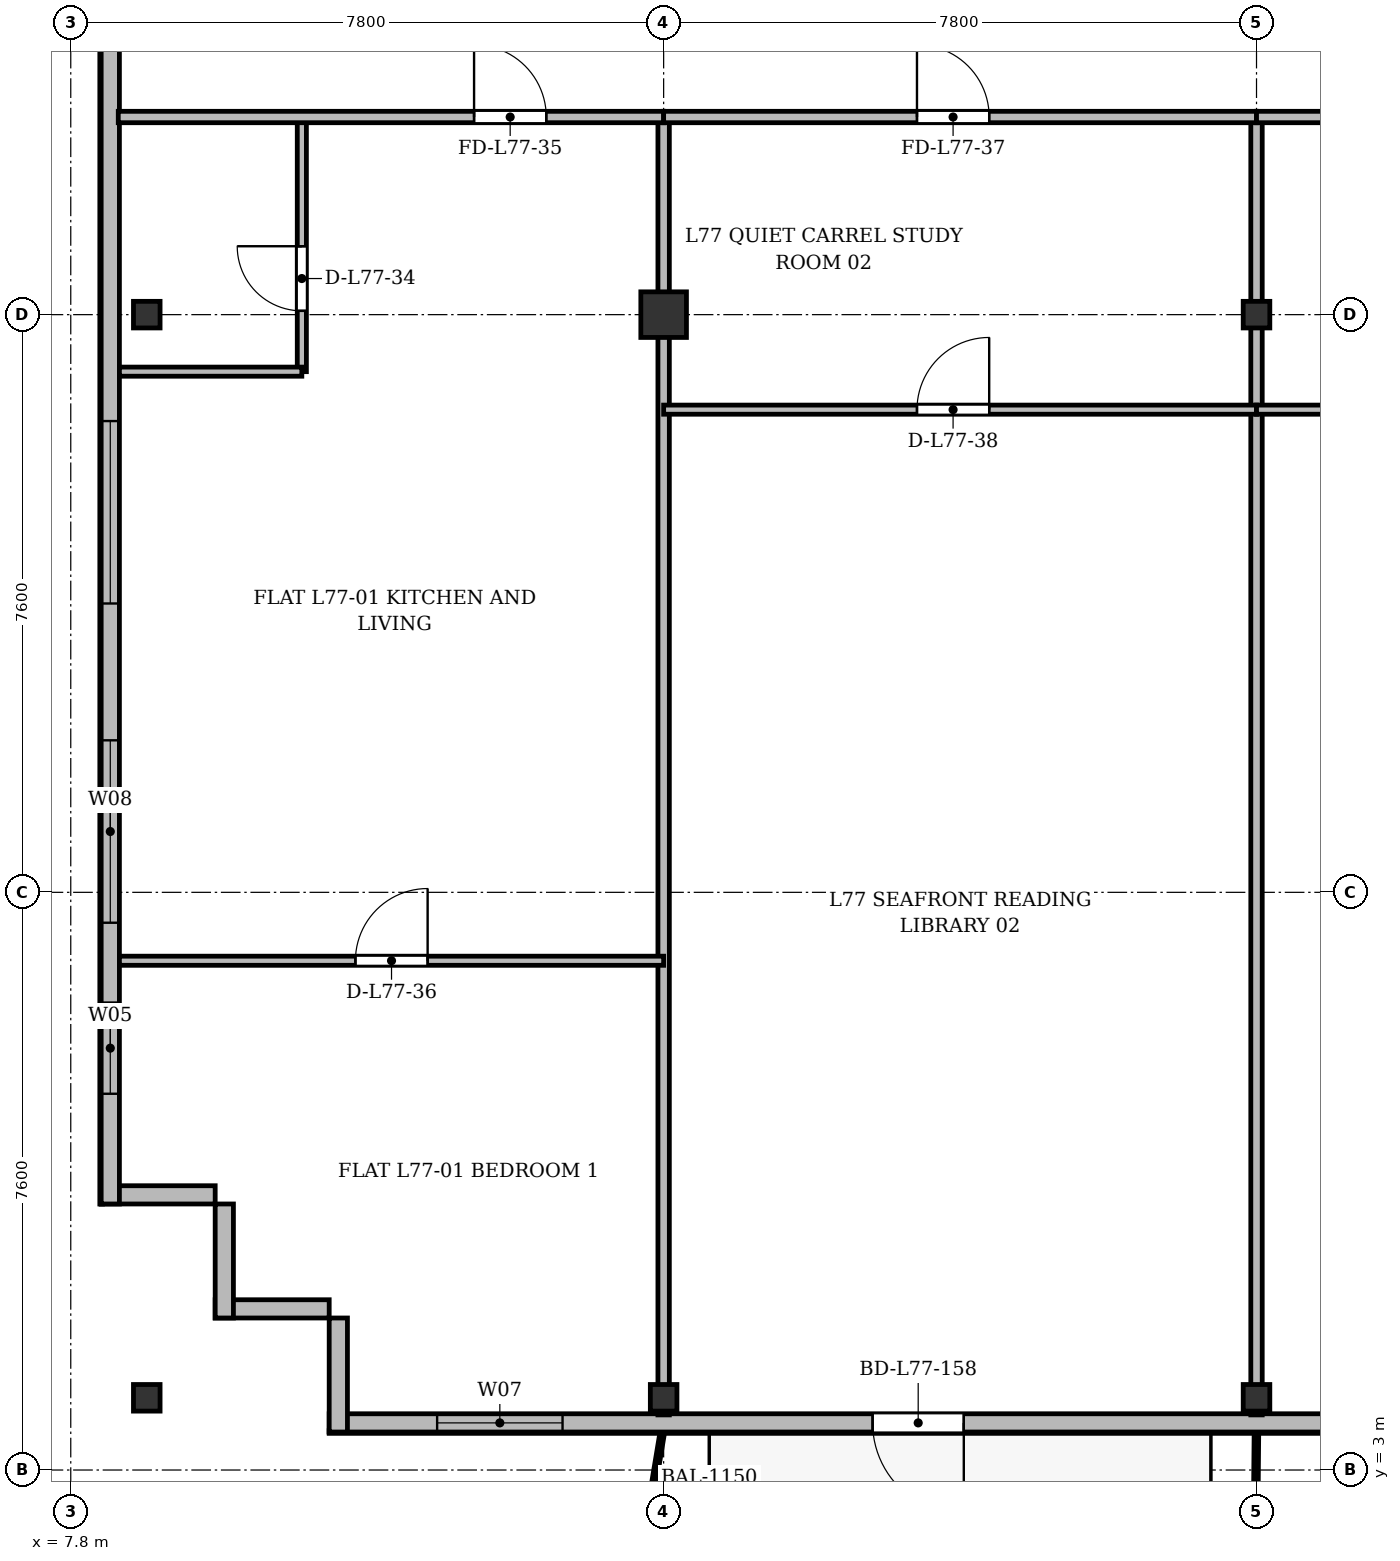
"""IFC4 building model, lengths in metres.
Left out: names, types, materials, properties, quantities, classifications, styles, units other than length and angle.
Written with IfcOpenShell. Run it as: python <this file> out.ifc"""

import sys

from ifc_helpers import new_model, si_unit, direction, frame, frame_2d, origin, origin_2d, place, context, subcontext, project, spatial, rectangle, i_section, extrude, source, transform, mapped, element, fill, save


model = new_model("IFC4")
c1 = context("Model", 3, precision=1e-05, world=origin(), true_north=direction((0.0, 1.0)))
c2 = subcontext(c1, "Body", "Model", "MODEL_VIEW")
j1 = project(units=[si_unit("LENGTHUNIT", "METRE"), si_unit("PLANEANGLEUNIT", "RADIAN")], contexts=[c1])
p1 = place(None, origin())
s1 = spatial("IfcSite", under=j1, at=p1, CompositionType="ELEMENT")
p2 = place(p1, origin())
s2 = spatial("IfcBuilding", under=s1, at=p2, CompositionType="ELEMENT")
p3 = place(p2, frame((0.0, 0.0, 295.5)))
s3 = spatial("IfcBuildingStorey", under=s2, at=p3, CompositionType="ELEMENT", Elevation=295.5)
m1 = source(origin(), c2, "Body", "SweptSolid", [
    extrude(i_section(OverallWidth=0.35, OverallDepth=0.35, WebThickness=0.018, FlangeThickness=0.028, at=origin_2d()), origin(), (0.0, 0.0, 1.0), 3.6),
])
for number, where, z_axis, x_axis in (
    (1, (8.8, 3.95, 0.0), (0.0, 0.0, 1.0), (1.0, 0.0, 0.0)),
    (2, (8.8, 18.2, 0.0), (0.0, 0.0, 1.0), (1.0, 0.0, 0.0)),
    (3, (15.6, 3.95, 0.0), (0.0, 0.0, 1.0), (1.0, 0.0, 0.0)),
):
    element("IfcColumn", number, at=place(p3, frame(where, z_axis=z_axis, x_axis=x_axis)), inside=s3, PredefinedType="COLUMN", context=c2, shape_type="MappedRepresentation", body=[
        mapped(m1, transform((0.0, 0.0, 0.0), x_axis=(1.0, 0.0, 0.0), y_axis=(0.0, 1.0, 0.0), z_axis=(0.0, 0.0, 1.0), scale=1.0)),
    ])
m2 = source(origin(), c2, "Body", "SweptSolid", [
    extrude(rectangle(XDim=0.6, YDim=0.6, at=origin_2d()), origin(), (0.0, 0.0, 1.0), 3.6),
])
p4 = place(p3, frame((15.6, 18.2, 0.0), z_axis=(0.0, 0.0, 1.0), x_axis=(1.0, 0.0, 0.0)))
e4 = element("IfcColumn", 4, at=p4, inside=s3, PredefinedType="COLUMN", context=c2, shape_type="MappedRepresentation", body=[
    mapped(m2, transform((0.0, 0.0, 0.0), x_axis=(1.0, 0.0, 0.0), y_axis=(0.0, 1.0, 0.0), z_axis=(0.0, 0.0, 1.0), scale=1.0)),
])
for number, where, z_axis, x_axis in (
    (5, (23.4, 3.95, 0.0), (0.0, 0.0, 1.0), (1.0, 0.0, 0.0)),
    (6, (23.4, 18.2, 0.0), (0.0, 0.0, 1.0), (1.0, 0.0, 0.0)),
):
    element("IfcColumn", number, at=place(p3, frame(where, z_axis=z_axis, x_axis=x_axis)), inside=s3, PredefinedType="COLUMN", context=c2, shape_type="MappedRepresentation", body=[
        mapped(m1, transform((0.0, 0.0, 0.0), x_axis=(1.0, 0.0, 0.0), y_axis=(0.0, 1.0, 0.0), z_axis=(0.0, 0.0, 1.0), scale=1.0)),
    ])
for number, where, z_axis, x_axis in (
    (7, (11.2, 5.12, 0.0), (0.0, 0.0, 1.0), (-1.0, 0.0, 0.0)),
    (8, (9.82, 5.0, 0.0), (0.0, 0.0, 1.0), (0.0, 1.0, 0.0)),
):
    element("IfcWall", number, at=place(p3, frame(where, z_axis=z_axis, x_axis=x_axis)), inside=s3, PredefinedType="SOLIDWALL", context=c2, shape_type="SweptSolid", body=[
        extrude(rectangle(XDim=1.5, YDim=0.24, at=frame_2d((0.75, 0.0))), origin(), (0.0, 0.0, 1.0), 3.26),
    ])
p5 = place(p3, frame((9.7, 6.62, 0.0), z_axis=(0.0, 0.0, 1.0), x_axis=(-1.0, 0.0, 0.0)))
e9 = element("IfcWall", 9, at=p5, inside=s3, PredefinedType="SOLIDWALL", context=c2, shape_type="SweptSolid", body=[
    extrude(rectangle(XDim=1.5, YDim=0.24, at=frame_2d((0.75, 0.0))), origin(), (0.0, 0.0, 1.0), 2.76),
])
p6 = place(p3, frame((8.32, 6.5, 0.0), z_axis=(0.0, 0.0, 1.0), x_axis=(0.0, 1.0, 0.0)))
e10 = element("IfcWall", 10, at=p6, inside=s3, PredefinedType="SOLIDWALL", context=c2, shape_type="SweptSolid", body=[
    extrude(rectangle(XDim=39.0, YDim=0.24, at=frame_2d((19.5, 0.0))), origin(), (0.0, 0.0, 1.0), 3.26),
])
p7 = place(p6, frame((1.45, 0.0, 0.92)))
e11 = element("IfcOpeningElement", 11, at=p7, cuts=e10, PredefinedType="OPENING", context=c2, shape_type="SweptSolid", body=[
    extrude(rectangle(XDim=1.2, YDim=1.65, at=frame_2d((0.6, 0.825))), frame((0.0, 0.13, 0.0), z_axis=(0.0, -1.0, 0.0), x_axis=(1.0, 0.0, 0.0)), (0.0, 0.0, 1.0), 0.26),
])
p8 = place(p6, frame((3.7, 0.0, 0.92)))
e12 = element("IfcOpeningElement", 12, at=p8, cuts=e10, PredefinedType="OPENING", context=c2, shape_type="SweptSolid", body=[
    extrude(rectangle(XDim=2.4, YDim=2.1, at=frame_2d((1.2, 1.05))), frame((0.0, 0.13, 0.0), z_axis=(0.0, -1.0, 0.0), x_axis=(1.0, 0.0, 0.0)), (0.0, 0.0, 1.0), 0.26),
])
p9 = place(p6, frame((7.9, 0.0, 0.92)))
e13 = element("IfcOpeningElement", 13, at=p9, cuts=e10, PredefinedType="OPENING", context=c2, shape_type="SweptSolid", body=[
    extrude(rectangle(XDim=2.4, YDim=2.1, at=frame_2d((1.2, 1.05))), frame((0.0, 0.13, 0.0), z_axis=(0.0, -1.0, 0.0), x_axis=(1.0, 0.0, 0.0)), (0.0, 0.0, 1.0), 0.26),
])
p10 = place(p6, frame((29.1, 0.0, 0.92)))
e14 = element("IfcOpeningElement", 14, at=p10, cuts=e10, PredefinedType="OPENING", context=c2, shape_type="SweptSolid", body=[
    extrude(rectangle(XDim=2.4, YDim=2.1, at=frame_2d((1.2, 1.05))), frame((0.0, 0.13, 0.0), z_axis=(0.0, -1.0, 0.0), x_axis=(1.0, 0.0, 0.0)), (0.0, 0.0, 1.0), 0.26),
])
p11 = place(p6, frame((33.3, 0.0, 0.92)))
e15 = element("IfcOpeningElement", 15, at=p11, cuts=e10, PredefinedType="OPENING", context=c2, shape_type="SweptSolid", body=[
    extrude(rectangle(XDim=1.2, YDim=1.65, at=frame_2d((0.6, 0.825))), frame((0.0, 0.13, 0.0), z_axis=(0.0, -1.0, 0.0), x_axis=(1.0, 0.0, 0.0)), (0.0, 0.0, 1.0), 0.26),
])
p12 = place(p6, frame((36.65, 0.0, 0.92)))
e16 = element("IfcOpeningElement", 16, at=p12, cuts=e10, PredefinedType="OPENING", context=c2, shape_type="SweptSolid", body=[
    extrude(rectangle(XDim=1.2, YDim=1.65, at=frame_2d((0.6, 0.825))), frame((0.0, 0.13, 0.0), z_axis=(0.0, -1.0, 0.0), x_axis=(1.0, 0.0, 0.0)), (0.0, 0.0, 1.0), 0.26),
])
p13 = place(p3, frame((31.4, 3.62, 0.0), z_axis=(0.0, 0.0, 1.0), x_axis=(-1.0, 0.0, 0.0)))
e17 = element("IfcWall", 17, at=p13, inside=s3, PredefinedType="SOLIDWALL", context=c2, shape_type="SweptSolid", body=[
    extrude(rectangle(XDim=20.2, YDim=0.24, at=frame_2d((10.1, 0.0))), origin(), (0.0, 0.0, 1.0), 3.26),
])
p14 = place(p13, frame((3.295, 0.0, 0.9)))
e18 = element("IfcOpeningElement", 18, at=p14, cuts=e17, PredefinedType="OPENING", context=c2, shape_type="SweptSolid", body=[
    extrude(rectangle(XDim=1.5, YDim=1.75, at=frame_2d((0.75, 0.875))), frame((0.0, 0.13, 0.0), z_axis=(0.0, -1.0, 0.0), x_axis=(1.0, 0.0, 0.0)), (0.0, 0.0, 1.0), 0.26),
])
p15 = place(p13, frame((11.851, 0.0, 0.0)))
e19 = element("IfcOpeningElement", 19, at=p15, cuts=e17, PredefinedType="OPENING", context=c2, shape_type="SweptSolid", body=[
    extrude(rectangle(XDim=1.2, YDim=2.2, at=frame_2d((0.6, 1.1))), frame((0.0, 0.13, 0.0), z_axis=(0.0, -1.0, 0.0), x_axis=(1.0, 0.0, 0.0)), (0.0, 0.0, 1.0), 0.26),
])
p16 = place(p13, frame((17.13, 0.0, 0.9)))
e20 = element("IfcOpeningElement", 20, at=p16, cuts=e17, PredefinedType="OPENING", context=c2, shape_type="SweptSolid", body=[
    extrude(rectangle(XDim=1.65, YDim=1.85, at=frame_2d((0.825, 0.925))), frame((0.0, 0.13, 0.0), z_axis=(0.0, -1.0, 0.0), x_axis=(1.0, 0.0, 0.0)), (0.0, 0.0, 1.0), 0.26),
])
p17 = place(p3, frame((11.32, 3.5, 0.0), z_axis=(0.0, 0.0, 1.0), x_axis=(0.0, 1.0, 0.0)))
e21 = element("IfcWall", 21, at=p17, inside=s3, PredefinedType="SOLIDWALL", context=c2, shape_type="SweptSolid", body=[
    extrude(rectangle(XDim=1.5, YDim=0.24, at=frame_2d((0.75, 0.0))), origin(), (0.0, 0.0, 1.0), 2.81),
])
for number, where, z_axis, x_axis in (
    (22, (15.6, 3.725, 0.0), (0.0, 0.0, 1.0), (0.0, 1.0, 0.0)),
    (23, (23.4, 3.725, 0.0), (0.0, 0.0, 1.0), (0.0, 1.0, 0.0)),
):
    element("IfcWall", number, at=place(p3, frame(where, z_axis=z_axis, x_axis=x_axis)), inside=s3, PredefinedType="PARTITIONING", context=c2, shape_type="SweptSolid", body=[
        extrude(rectangle(XDim=17.075, YDim=0.15, at=frame_2d((8.538, 0.0))), origin(), (0.0, 0.0, 1.0), 2.76),
    ])
p18 = place(p3, frame((10.84, 17.45, 0.0), z_axis=(0.0, 0.0, 1.0), x_axis=(0.0, 1.0, 0.0)))
e24 = element("IfcWall", 24, at=p18, inside=s3, PredefinedType="PARTITIONING", context=c2, shape_type="SweptSolid", body=[
    extrude(rectangle(XDim=3.35, YDim=0.12, at=frame_2d((1.675, 0.0))), origin(), (0.0, 0.0, 1.0), 2.81),
])
p19 = place(p18, frame((0.8, 0.0, 0.0)))
e25 = element("IfcOpeningElement", 25, at=p19, cuts=e24, PredefinedType="OPENING", context=c2, shape_type="SweptSolid", body=[
    extrude(rectangle(XDim=0.85, YDim=2.1, at=frame_2d((0.425, 1.05))), frame((0.0, 0.07, 0.0), z_axis=(0.0, -1.0, 0.0), x_axis=(1.0, 0.0, 0.0)), (0.0, 0.0, 1.0), 0.14),
])
p20 = place(p3, frame((8.44, 17.45, 0.0), z_axis=(0.0, 0.0, 1.0), x_axis=(1.0, 0.0, 0.0)))
e26 = element("IfcWall", 26, at=p20, inside=s3, PredefinedType="PARTITIONING", context=c2, shape_type="SweptSolid", body=[
    extrude(rectangle(XDim=2.4, YDim=0.12, at=frame_2d((1.2, 0.0))), origin(), (0.0, 0.0, 1.0), 2.76),
])
p21 = place(p3, frame((8.425, 20.8, 0.0), z_axis=(0.0, 0.0, 1.0), x_axis=(1.0, 0.0, 0.0)))
e27 = element("IfcWall", 27, at=p21, inside=s3, PredefinedType="PARTITIONING", context=c2, shape_type="SweptSolid", body=[
    extrude(rectangle(XDim=7.175, YDim=0.15, at=frame_2d((3.587, 0.0))), origin(), (0.0, 0.0, 1.0), 2.76),
])
p22 = place(p21, frame((4.681, 0.0, 0.0)))
e28 = element("IfcOpeningElement", 28, at=p22, cuts=e27, PredefinedType="OPENING", context=c2, shape_type="SweptSolid", body=[
    extrude(rectangle(XDim=0.95, YDim=2.15, at=frame_2d((0.475, 1.075))), frame((0.0, 0.085, 0.0), z_axis=(0.0, -1.0, 0.0), x_axis=(1.0, 0.0, 0.0)), (0.0, 0.0, 1.0), 0.17),
])
p23 = place(p3, frame((8.44, 9.7, 0.0), z_axis=(0.0, 0.0, 1.0), x_axis=(1.0, 0.0, 0.0)))
e29 = element("IfcWall", 29, at=p23, inside=s3, PredefinedType="PARTITIONING", context=c2, shape_type="SweptSolid", body=[
    extrude(rectangle(XDim=7.16, YDim=0.12, at=frame_2d((3.58, 0.0))), origin(), (0.0, 0.0, 1.0), 2.76),
])
p24 = place(p23, frame((3.105, 0.0, 0.0)))
e30 = element("IfcOpeningElement", 30, at=p24, cuts=e29, PredefinedType="OPENING", context=c2, shape_type="SweptSolid", body=[
    extrude(rectangle(XDim=0.95, YDim=2.15, at=frame_2d((0.475, 1.075))), frame((0.0, 0.07, 0.0), z_axis=(0.0, -1.0, 0.0), x_axis=(1.0, 0.0, 0.0)), (0.0, 0.0, 1.0), 0.14),
])
p25 = place(p3, frame((15.6, 20.8, 0.0), z_axis=(0.0, 0.0, 1.0), x_axis=(1.0, 0.0, 0.0)))
e31 = element("IfcWall", 31, at=p25, inside=s3, PredefinedType="PARTITIONING", context=c2, shape_type="SweptSolid", body=[
    extrude(rectangle(XDim=7.8, YDim=0.15, at=frame_2d((3.9, 0.0))), origin(), (0.0, 0.0, 1.0), 2.76),
])
p26 = place(p25, frame((3.333, 0.0, 0.0)))
e32 = element("IfcOpeningElement", 32, at=p26, cuts=e31, PredefinedType="OPENING", context=c2, shape_type="SweptSolid", body=[
    extrude(rectangle(XDim=0.95, YDim=2.15, at=frame_2d((0.475, 1.075))), frame((0.0, 0.085, 0.0), z_axis=(0.0, -1.0, 0.0), x_axis=(1.0, 0.0, 0.0)), (0.0, 0.0, 1.0), 0.17),
])
p27 = place(p3, frame((15.6, 16.95, 0.0), z_axis=(0.0, 0.0, 1.0), x_axis=(1.0, 0.0, 0.0)))
e33 = element("IfcWall", 33, at=p27, inside=s3, PredefinedType="PARTITIONING", context=c2, shape_type="SweptSolid", body=[
    extrude(rectangle(XDim=7.8, YDim=0.12, at=frame_2d((3.9, 0.0))), origin(), (0.0, 0.0, 1.0), 2.76),
])
p28 = place(p27, frame((3.333, 0.0, 0.0)))
e34 = element("IfcOpeningElement", 34, at=p28, cuts=e33, PredefinedType="OPENING", context=c2, shape_type="SweptSolid", body=[
    extrude(rectangle(XDim=0.95, YDim=2.15, at=frame_2d((0.475, 1.075))), frame((0.0, 0.07, 0.0), z_axis=(0.0, -1.0, 0.0), x_axis=(1.0, 0.0, 0.0)), (0.0, 0.0, 1.0), 0.14),
])
p29 = place(p3, frame((23.4, 20.8, 0.0), z_axis=(0.0, 0.0, 1.0), x_axis=(1.0, 0.0, 0.0)))
e35 = element("IfcWall", 35, at=p29, inside=s3, PredefinedType="PARTITIONING", context=c2, shape_type="SweptSolid", body=[
    extrude(rectangle(XDim=9.8, YDim=0.15, at=frame_2d((4.9, 0.0))), origin(), (0.0, 0.0, 1.0), 2.76),
])
p30 = place(p29, frame((4.425, 0.0, 0.0)))
e36 = element("IfcOpeningElement", 36, at=p30, cuts=e35, PredefinedType="OPENING", context=c2, shape_type="SweptSolid", body=[
    extrude(rectangle(XDim=0.95, YDim=2.15, at=frame_2d((0.475, 1.075))), frame((0.0, 0.085, 0.0), z_axis=(0.0, -1.0, 0.0), x_axis=(1.0, 0.0, 0.0)), (0.0, 0.0, 1.0), 0.17),
])
p31 = place(p3, frame((23.4, 16.95, 0.0), z_axis=(0.0, 0.0, 1.0), x_axis=(1.0, 0.0, 0.0)))
e37 = element("IfcWall", 37, at=p31, inside=s3, PredefinedType="PARTITIONING", context=c2, shape_type="SweptSolid", body=[
    extrude(rectangle(XDim=9.8, YDim=0.12, at=frame_2d((4.9, 0.0))), origin(), (0.0, 0.0, 1.0), 2.76),
])
p32 = place(p31, frame((4.425, 0.0, 0.0)))
e38 = element("IfcOpeningElement", 38, at=p32, cuts=e37, PredefinedType="OPENING", context=c2, shape_type="SweptSolid", body=[
    extrude(rectangle(XDim=0.95, YDim=2.15, at=frame_2d((0.475, 1.075))), frame((0.0, 0.07, 0.0), z_axis=(0.0, -1.0, 0.0), x_axis=(1.0, 0.0, 0.0)), (0.0, 0.0, 1.0), 0.14),
])
m3 = source(origin(), c2, "Body", "SweptSolid", [
    extrude(rectangle(XDim=1.2, YDim=1.65, at=frame_2d((0.6, 0.825))), frame((0.0, 0.03, 0.0), z_axis=(0.0, -1.0, 0.0), x_axis=(1.0, 0.0, 0.0)), (0.0, 0.0, 1.0), 0.06),
])
p33 = place(p7, origin())
e39 = element("IfcWindow", 39, at=p33, inside=s3, PartitioningType="SINGLE_PANEL", PredefinedType="WINDOW", context=c2, shape_type="MappedRepresentation", body=[
    mapped(m3, transform((0.0, 0.0, 0.0), x_axis=(1.0, 0.0, 0.0), y_axis=(0.0, 1.0, 0.0), z_axis=(0.0, 0.0, 1.0), scale=1.0)),
])
fill(e11, e39)
m4 = source(origin(), c2, "Body", "SweptSolid", [
    extrude(rectangle(XDim=2.4, YDim=2.1, at=frame_2d((1.2, 1.05))), frame((0.0, 0.03, 0.0), z_axis=(0.0, -1.0, 0.0), x_axis=(1.0, 0.0, 0.0)), (0.0, 0.0, 1.0), 0.06),
])
p34 = place(p8, origin())
e40 = element("IfcWindow", 40, at=p34, inside=s3, PartitioningType="SINGLE_PANEL", PredefinedType="WINDOW", context=c2, shape_type="MappedRepresentation", body=[
    mapped(m4, transform((0.0, 0.0, 0.0), x_axis=(1.0, 0.0, 0.0), y_axis=(0.0, 1.0, 0.0), z_axis=(0.0, 0.0, 1.0), scale=1.0)),
])
fill(e12, e40)
p35 = place(p9, origin())
e41 = element("IfcWindow", 41, at=p35, inside=s3, PartitioningType="SINGLE_PANEL", PredefinedType="WINDOW", context=c2, shape_type="MappedRepresentation", body=[
    mapped(m4, transform((0.0, 0.0, 0.0), x_axis=(1.0, 0.0, 0.0), y_axis=(0.0, 1.0, 0.0), z_axis=(0.0, 0.0, 1.0), scale=1.0)),
])
fill(e13, e41)
m5 = source(origin(), c2, "Body", "SweptSolid", [
    extrude(rectangle(XDim=1.2, YDim=2.2, at=frame_2d((0.6, 1.1))), frame((0.0, 0.025, 0.0), z_axis=(0.0, -1.0, 0.0), x_axis=(1.0, 0.0, 0.0)), (0.0, 0.0, 1.0), 0.05),
])
p36 = place(p15, origin())
e42 = element("IfcDoor", 42, at=p36, inside=s3, OperationType="SINGLE_SWING_LEFT", PredefinedType="DOOR", context=c2, shape_type="MappedRepresentation", body=[
    mapped(m5, transform((0.0, 0.0, 0.0), x_axis=(1.0, 0.0, 0.0), y_axis=(0.0, 1.0, 0.0), z_axis=(0.0, 0.0, 1.0), scale=1.0)),
])
fill(e19, e42)
m6 = source(origin(), c2, "Body", "SweptSolid", [
    extrude(rectangle(XDim=1.65, YDim=1.85, at=frame_2d((0.825, 0.925))), frame((0.0, 0.03, 0.0), z_axis=(0.0, -1.0, 0.0), x_axis=(1.0, 0.0, 0.0)), (0.0, 0.0, 1.0), 0.06),
])
p37 = place(p16, origin())
e43 = element("IfcWindow", 43, at=p37, inside=s3, PartitioningType="SINGLE_PANEL", PredefinedType="WINDOW", context=c2, shape_type="MappedRepresentation", body=[
    mapped(m6, transform((0.0, 0.0, 0.0), x_axis=(1.0, 0.0, 0.0), y_axis=(0.0, 1.0, 0.0), z_axis=(0.0, 0.0, 1.0), scale=1.0)),
])
fill(e20, e43)
m7 = source(origin(), c2, "Body", "SweptSolid", [
    extrude(rectangle(XDim=0.85, YDim=2.1, at=frame_2d((0.425, 1.05))), frame((0.0, 0.025, 0.0), z_axis=(0.0, -1.0, 0.0), x_axis=(1.0, 0.0, 0.0)), (0.0, 0.0, 1.0), 0.05),
])
p38 = place(p19, origin())
e44 = element("IfcDoor", 44, at=p38, inside=s3, OperationType="SINGLE_SWING_RIGHT", PredefinedType="DOOR", context=c2, shape_type="MappedRepresentation", body=[
    mapped(m7, transform((0.0, 0.0, 0.0), x_axis=(1.0, 0.0, 0.0), y_axis=(0.0, 1.0, 0.0), z_axis=(0.0, 0.0, 1.0), scale=1.0)),
])
fill(e25, e44)
m8 = source(origin(), c2, "Body", "SweptSolid", [
    extrude(rectangle(XDim=0.95, YDim=2.15, at=frame_2d((0.475, 1.075))), frame((0.0, 0.025, 0.0), z_axis=(0.0, -1.0, 0.0), x_axis=(1.0, 0.0, 0.0)), (0.0, 0.0, 1.0), 0.05),
])
p39 = place(p22, origin())
e45 = element("IfcDoor", 45, at=p39, inside=s3, OperationType="SINGLE_SWING_LEFT", PredefinedType="DOOR", context=c2, shape_type="MappedRepresentation", body=[
    mapped(m8, transform((0.0, 0.0, 0.0), x_axis=(1.0, 0.0, 0.0), y_axis=(0.0, 1.0, 0.0), z_axis=(0.0, 0.0, 1.0), scale=1.0)),
])
fill(e28, e45)
p40 = place(p24, origin())
e46 = element("IfcDoor", 46, at=p40, inside=s3, OperationType="SINGLE_SWING_RIGHT", PredefinedType="DOOR", context=c2, shape_type="MappedRepresentation", body=[
    mapped(m8, transform((0.0, 0.0, 0.0), x_axis=(1.0, 0.0, 0.0), y_axis=(0.0, 1.0, 0.0), z_axis=(0.0, 0.0, 1.0), scale=1.0)),
])
fill(e30, e46)
p41 = place(p26, origin())
e47 = element("IfcDoor", 47, at=p41, inside=s3, OperationType="SINGLE_SWING_LEFT", PredefinedType="DOOR", context=c2, shape_type="MappedRepresentation", body=[
    mapped(m8, transform((0.0, 0.0, 0.0), x_axis=(1.0, 0.0, 0.0), y_axis=(0.0, 1.0, 0.0), z_axis=(0.0, 0.0, 1.0), scale=1.0)),
])
fill(e32, e47)
p42 = place(p28, origin())
e48 = element("IfcDoor", 48, at=p42, inside=s3, OperationType="SINGLE_SWING_RIGHT", PredefinedType="DOOR", context=c2, shape_type="MappedRepresentation", body=[
    mapped(m8, transform((0.0, 0.0, 0.0), x_axis=(1.0, 0.0, 0.0), y_axis=(0.0, 1.0, 0.0), z_axis=(0.0, 0.0, 1.0), scale=1.0)),
])
fill(e34, e48)
save(model, sys.argv[1])
